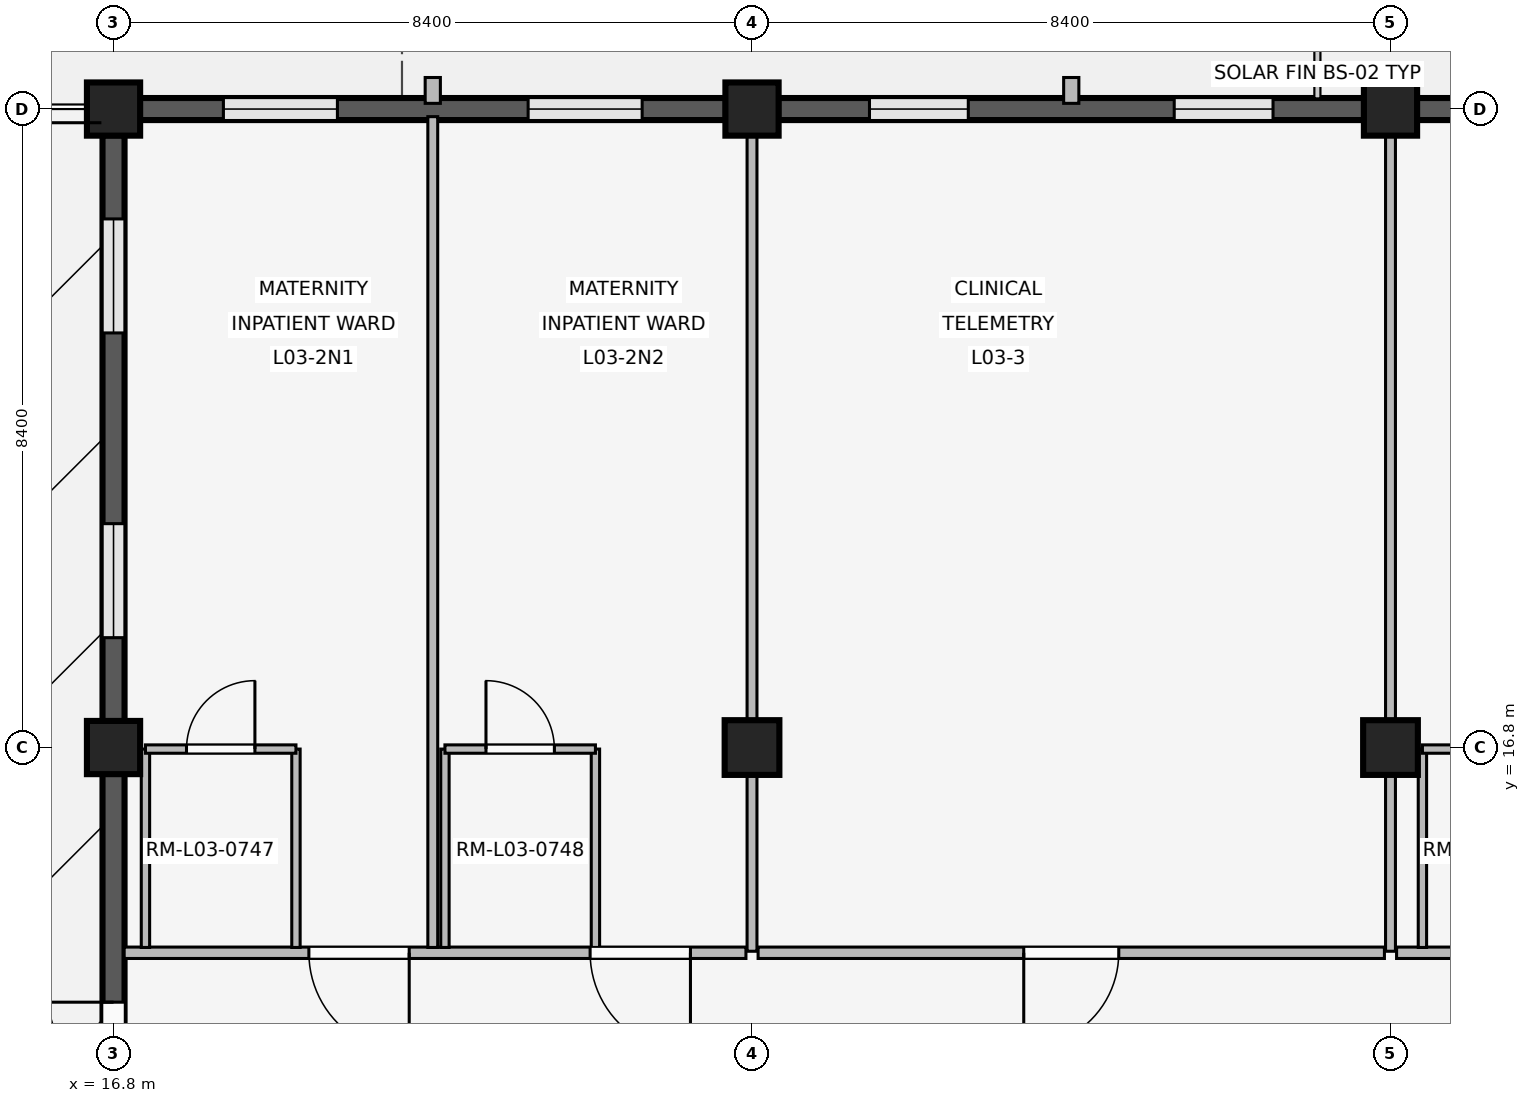
"""IFC4 building model, lengths in metres.
Left out: names, types, materials, properties, quantities, classifications, styles, units other than length and angle.
Written with IfcOpenShell. Run it as: python <this file> out.ifc"""

import sys

from ifc_helpers import new_model, si_unit, direction, frame, frame_2d, origin, origin_2d, place, context, subcontext, project, spatial, rectangle, extrude, element, fill, save


model = new_model("IFC4")
c1 = context("Model", 3, precision=1e-05, world=origin(), true_north=direction((0.0, 1.0)))
c2 = subcontext(c1, "Body", "Model", "MODEL_VIEW")
j1 = project(units=[si_unit("LENGTHUNIT", "METRE"), si_unit("PLANEANGLEUNIT", "RADIAN")], contexts=[c1])
p1 = place(None, origin())
s1 = spatial("IfcSite", under=j1, at=p1, CompositionType="ELEMENT")
p2 = place(p1, origin())
s2 = spatial("IfcBuilding", under=s1, at=p2, CompositionType="ELEMENT")
p3 = place(p2, frame((0.0, 0.0, 12.9)))
s3 = spatial("IfcBuildingStorey", under=s2, at=p3, CompositionType="ELEMENT", Elevation=12.9)
for number, where, z_axis, x_axis in (
    (1, (16.8, 16.8, 0.0), (0.0, 0.0, 1.0), (1.0, 0.0, 0.0)),
    (2, (16.8, 25.2, 0.0), (0.0, 0.0, 1.0), (1.0, 0.0, 0.0)),
):
    element("IfcColumn", number, at=place(p3, frame(where, z_axis=z_axis, x_axis=x_axis)), inside=s3, PredefinedType="COLUMN", context=c2, shape_type="SweptSolid", body=[
        extrude(rectangle(XDim=0.7, YDim=0.7, at=origin_2d()), origin(), (0.0, 0.0, 1.0), 3.3),
    ])
p4 = place(p3, frame((25.2, 16.8, 0.0), z_axis=(0.0, 0.0, 1.0), x_axis=(1.0, 0.0, 0.0)))
e3 = element("IfcColumn", 3, at=p4, inside=s3, PredefinedType="COLUMN", context=c2, shape_type="SweptSolid", body=[
    extrude(rectangle(XDim=0.72, YDim=0.72, at=origin_2d()), origin(), (0.0, 0.0, 1.0), 3.3),
])
p5 = place(p3, frame((25.2, 25.2, 0.0), z_axis=(0.0, 0.0, 1.0), x_axis=(1.0, 0.0, 0.0)))
e4 = element("IfcColumn", 4, at=p5, inside=s3, PredefinedType="COLUMN", context=c2, shape_type="SweptSolid", body=[
    extrude(rectangle(XDim=0.7, YDim=0.7, at=origin_2d()), origin(), (0.0, 0.0, 1.0), 3.3),
])
p6 = place(p3, frame((33.6, 16.8, 0.0), z_axis=(0.0, 0.0, 1.0), x_axis=(1.0, 0.0, 0.0)))
e5 = element("IfcColumn", 5, at=p6, inside=s3, PredefinedType="COLUMN", context=c2, shape_type="SweptSolid", body=[
    extrude(rectangle(XDim=0.72, YDim=0.72, at=origin_2d()), origin(), (0.0, 0.0, 1.0), 3.3),
])
p7 = place(p3, frame((33.6, 25.2, 0.0), z_axis=(0.0, 0.0, 1.0), x_axis=(1.0, 0.0, 0.0)))
e6 = element("IfcColumn", 6, at=p7, inside=s3, PredefinedType="COLUMN", context=c2, shape_type="SweptSolid", body=[
    extrude(rectangle(XDim=0.7, YDim=0.7, at=origin_2d()), origin(), (0.0, 0.0, 1.0), 3.3),
])
p8 = place(p3, frame((16.8, 8.745, 0.0), z_axis=(0.0, 0.0, 1.0), x_axis=(0.0, 1.0, 0.0)))
e7 = element("IfcWall", 7, at=p8, inside=s3, PredefinedType="SOLIDWALL", context=c2, shape_type="SweptSolid", body=[
    extrude(rectangle(XDim=7.71, YDim=0.29, at=frame_2d((3.855, 0.0))), origin(), (0.0, 0.0, 1.0), 2.44),
])
p9 = place(p8, frame((3.005, 0.0, 0.0)))
e8 = element("IfcOpeningElement", 8, at=p9, cuts=e7, PredefinedType="OPENING", context=c2, shape_type="SweptSolid", body=[
    extrude(rectangle(XDim=1.7, YDim=2.3, at=frame_2d((0.85, 1.15))), frame((0.0, 0.155, 0.0), z_axis=(0.0, -1.0, 0.0), x_axis=(1.0, 0.0, 0.0)), (0.0, 0.0, 1.0), 0.31),
])
p10 = place(p3, frame((17.145, 25.2, 0.0), z_axis=(0.0, 0.0, 1.0), x_axis=(1.0, 0.0, 0.0)))
e9 = element("IfcWall", 9, at=p10, inside=s3, PredefinedType="SOLIDWALL", context=c2, shape_type="SweptSolid", body=[
    extrude(rectangle(XDim=7.71, YDim=0.29, at=frame_2d((3.855, 0.0))), origin(), (0.0, 0.0, 1.0), 2.44),
])
p11 = place(p10, frame((1.1, 0.0, 1.05)))
e10 = element("IfcOpeningElement", 10, at=p11, cuts=e9, PredefinedType="OPENING", context=c2, shape_type="SweptSolid", body=[
    extrude(rectangle(XDim=1.5, YDim=0.75, at=frame_2d((0.75, 0.375))), frame((0.0, 0.155, 0.0), z_axis=(0.0, -1.0, 0.0), x_axis=(1.0, 0.0, 0.0)), (0.0, 0.0, 1.0), 0.31),
])
p12 = place(p10, frame((5.11, 0.0, 1.05)))
e11 = element("IfcOpeningElement", 11, at=p12, cuts=e9, PredefinedType="OPENING", context=c2, shape_type="SweptSolid", body=[
    extrude(rectangle(XDim=1.5, YDim=0.75, at=frame_2d((0.75, 0.375))), frame((0.0, 0.155, 0.0), z_axis=(0.0, -1.0, 0.0), x_axis=(1.0, 0.0, 0.0)), (0.0, 0.0, 1.0), 0.31),
])
p13 = place(p3, frame((21.0, 25.275, 0.0), z_axis=(0.0, 0.0, 1.0), x_axis=(0.0, 1.0, 0.0)))
e12 = element("IfcWall", 12, at=p13, inside=s3, PredefinedType="ELEMENTEDWALL", context=c2, shape_type="SweptSolid", body=[
    extrude(rectangle(XDim=0.34, YDim=0.2, at=frame_2d((0.17, 0.0))), origin(), (0.0, 0.0, 1.0), 2.42),
])
p14 = place(p3, frame((16.8, 17.145, 0.0), z_axis=(0.0, 0.0, 1.0), x_axis=(0.0, 1.0, 0.0)))
e13 = element("IfcWall", 13, at=p14, inside=s3, PredefinedType="SOLIDWALL", context=c2, shape_type="SweptSolid", body=[
    extrude(rectangle(XDim=7.71, YDim=0.29, at=frame_2d((3.855, 0.0))), origin(), (0.0, 0.0, 1.0), 2.44),
])
p15 = place(p14, frame((1.1, 0.0, 1.05)))
e14 = element("IfcOpeningElement", 14, at=p15, cuts=e13, PredefinedType="OPENING", context=c2, shape_type="SweptSolid", body=[
    extrude(rectangle(XDim=1.5, YDim=0.75, at=frame_2d((0.75, 0.375))), frame((0.0, 0.155, 0.0), z_axis=(0.0, -1.0, 0.0), x_axis=(1.0, 0.0, 0.0)), (0.0, 0.0, 1.0), 0.31),
])
p16 = place(p14, frame((5.11, 0.0, 1.05)))
e15 = element("IfcOpeningElement", 15, at=p16, cuts=e13, PredefinedType="OPENING", context=c2, shape_type="SweptSolid", body=[
    extrude(rectangle(XDim=1.5, YDim=0.75, at=frame_2d((0.75, 0.375))), frame((0.0, 0.155, 0.0), z_axis=(0.0, -1.0, 0.0), x_axis=(1.0, 0.0, 0.0)), (0.0, 0.0, 1.0), 0.31),
])
p17 = place(p3, frame((25.545, 25.2, 0.0), z_axis=(0.0, 0.0, 1.0), x_axis=(1.0, 0.0, 0.0)))
e16 = element("IfcWall", 16, at=p17, inside=s3, PredefinedType="SOLIDWALL", context=c2, shape_type="SweptSolid", body=[
    extrude(rectangle(XDim=7.71, YDim=0.29, at=frame_2d((3.855, 0.0))), origin(), (0.0, 0.0, 1.0), 2.44),
])
p18 = place(p17, frame((1.2, 0.0, 1.05)))
e17 = element("IfcOpeningElement", 17, at=p18, cuts=e16, PredefinedType="OPENING", context=c2, shape_type="SweptSolid", body=[
    extrude(rectangle(XDim=1.3, YDim=0.75, at=frame_2d((0.65, 0.375))), frame((0.0, 0.155, 0.0), z_axis=(0.0, -1.0, 0.0), x_axis=(1.0, 0.0, 0.0)), (0.0, 0.0, 1.0), 0.31),
])
p19 = place(p17, frame((5.21, 0.0, 1.05)))
e18 = element("IfcOpeningElement", 18, at=p19, cuts=e16, PredefinedType="OPENING", context=c2, shape_type="SweptSolid", body=[
    extrude(rectangle(XDim=1.3, YDim=0.75, at=frame_2d((0.65, 0.375))), frame((0.0, 0.155, 0.0), z_axis=(0.0, -1.0, 0.0), x_axis=(1.0, 0.0, 0.0)), (0.0, 0.0, 1.0), 0.31),
])
p20 = place(p3, frame((29.4, 25.275, 0.0), z_axis=(0.0, 0.0, 1.0), x_axis=(0.0, 1.0, 0.0)))
e19 = element("IfcWall", 19, at=p20, inside=s3, PredefinedType="ELEMENTEDWALL", context=c2, shape_type="SweptSolid", body=[
    extrude(rectangle(XDim=0.34, YDim=0.2, at=frame_2d((0.17, 0.0))), origin(), (0.0, 0.0, 1.0), 2.42),
])
p21 = place(p3, frame((33.945, 25.2, 0.0), z_axis=(0.0, 0.0, 1.0), x_axis=(1.0, 0.0, 0.0)))
e20 = element("IfcWall", 20, at=p21, inside=s3, PredefinedType="SOLIDWALL", context=c2, shape_type="SweptSolid", body=[
    extrude(rectangle(XDim=7.71, YDim=0.29, at=frame_2d((3.855, 0.0))), origin(), (0.0, 0.0, 1.0), 2.44),
])
p22 = place(p21, frame((0.963, 0.0, 0.85)))
e21 = element("IfcOpeningElement", 21, at=p22, cuts=e20, PredefinedType="OPENING", context=c2, shape_type="SweptSolid", body=[
    extrude(rectangle(XDim=1.62, YDim=0.95, at=frame_2d((0.81, 0.475))), frame((0.0, 0.155, 0.0), z_axis=(0.0, -1.0, 0.0), x_axis=(1.0, 0.0, 0.0)), (0.0, 0.0, 1.0), 0.31),
])
p23 = place(p21, frame((5.127, 0.0, 0.85)))
e22 = element("IfcOpeningElement", 22, at=p23, cuts=e20, PredefinedType="OPENING", context=c2, shape_type="SweptSolid", body=[
    extrude(rectangle(XDim=1.62, YDim=0.95, at=frame_2d((0.81, 0.475))), frame((0.0, 0.155, 0.0), z_axis=(0.0, -1.0, 0.0), x_axis=(1.0, 0.0, 0.0)), (0.0, 0.0, 1.0), 0.31),
])
p24 = place(p3, frame((25.12, 14.1, 0.0), z_axis=(0.0, 0.0, 1.0), x_axis=(-1.0, 0.0, 0.0)))
e23 = element("IfcWall", 23, at=p24, inside=s3, PredefinedType="PARTITIONING", context=c2, shape_type="SweptSolid", body=[
    extrude(rectangle(XDim=8.18, YDim=0.15, at=frame_2d((4.09, 0.0))), origin(), (0.0, 0.0, 1.0), 2.42),
])
p25 = place(p24, frame((0.73, 0.0, 0.0)))
e24 = element("IfcOpeningElement", 24, at=p25, cuts=e23, PredefinedType="OPENING", context=c2, shape_type="SweptSolid", body=[
    extrude(rectangle(XDim=1.32, YDim=2.25, at=frame_2d((0.66, 1.125))), frame((0.0, 0.085, 0.0), z_axis=(0.0, -1.0, 0.0), x_axis=(1.0, 0.0, 0.0)), (0.0, 0.0, 1.0), 0.17),
])
p26 = place(p24, frame((4.43, 0.0, 0.0)))
e25 = element("IfcOpeningElement", 25, at=p26, cuts=e23, PredefinedType="OPENING", context=c2, shape_type="SweptSolid", body=[
    extrude(rectangle(XDim=1.32, YDim=2.25, at=frame_2d((0.66, 1.125))), frame((0.0, 0.085, 0.0), z_axis=(0.0, -1.0, 0.0), x_axis=(1.0, 0.0, 0.0)), (0.0, 0.0, 1.0), 0.17),
])
p27 = place(p3, frame((21.0, 14.17, 0.0), z_axis=(0.0, 0.0, 1.0), x_axis=(0.0, 1.0, 0.0)))
e26 = element("IfcWall", 26, at=p27, inside=s3, PredefinedType="PARTITIONING", context=c2, shape_type="SweptSolid", body=[
    extrude(rectangle(XDim=10.93, YDim=0.13, at=frame_2d((5.465, 0.0))), origin(), (0.0, 0.0, 1.0), 2.42),
])
for number, where, z_axis, x_axis in (
    (27, (17.22, 14.17, 0.0), (0.0, 0.0, 1.0), (0.0, 1.0, 0.0)),
    (28, (19.2, 14.17, 0.0), (0.0, 0.0, 1.0), (0.0, 1.0, 0.0)),
):
    element("IfcWall", number, at=place(p3, frame(where, z_axis=z_axis, x_axis=x_axis)), inside=s3, PredefinedType="PARTITIONING", context=c2, shape_type="SweptSolid", body=[
        extrude(rectangle(XDim=2.61, YDim=0.11, at=frame_2d((1.305, 0.0))), origin(), (0.0, 0.0, 1.0), 2.42),
    ])
p28 = place(p3, frame((17.22, 16.78, 0.0), z_axis=(0.0, 0.0, 1.0), x_axis=(1.0, 0.0, 0.0)))
e29 = element("IfcWall", 29, at=p28, inside=s3, PredefinedType="PARTITIONING", context=c2, shape_type="SweptSolid", body=[
    extrude(rectangle(XDim=1.98, YDim=0.11, at=frame_2d((0.99, 0.0))), origin(), (0.0, 0.0, 1.0), 2.42),
])
p29 = place(p28, frame((0.54, 0.0, 0.0)))
e30 = element("IfcOpeningElement", 30, at=p29, cuts=e29, PredefinedType="OPENING", context=c2, shape_type="SweptSolid", body=[
    extrude(rectangle(XDim=0.9, YDim=2.1, at=frame_2d((0.45, 1.05))), frame((0.0, 0.065, 0.0), z_axis=(0.0, -1.0, 0.0), x_axis=(1.0, 0.0, 0.0)), (0.0, 0.0, 1.0), 0.13),
])
for number, where, z_axis, x_axis in (
    (31, (21.16, 14.17, 0.0), (0.0, 0.0, 1.0), (0.0, 1.0, 0.0)),
    (32, (23.14, 14.17, 0.0), (0.0, 0.0, 1.0), (0.0, 1.0, 0.0)),
):
    element("IfcWall", number, at=place(p3, frame(where, z_axis=z_axis, x_axis=x_axis)), inside=s3, PredefinedType="PARTITIONING", context=c2, shape_type="SweptSolid", body=[
        extrude(rectangle(XDim=2.61, YDim=0.11, at=frame_2d((1.305, 0.0))), origin(), (0.0, 0.0, 1.0), 2.42),
    ])
p30 = place(p3, frame((21.16, 16.78, 0.0), z_axis=(0.0, 0.0, 1.0), x_axis=(1.0, 0.0, 0.0)))
e33 = element("IfcWall", 33, at=p30, inside=s3, PredefinedType="PARTITIONING", context=c2, shape_type="SweptSolid", body=[
    extrude(rectangle(XDim=1.98, YDim=0.11, at=frame_2d((0.99, 0.0))), origin(), (0.0, 0.0, 1.0), 2.42),
])
p31 = place(p30, frame((0.54, 0.0, 0.0)))
e34 = element("IfcOpeningElement", 34, at=p31, cuts=e33, PredefinedType="OPENING", context=c2, shape_type="SweptSolid", body=[
    extrude(rectangle(XDim=0.9, YDim=2.1, at=frame_2d((0.45, 1.05))), frame((0.0, 0.065, 0.0), z_axis=(0.0, -1.0, 0.0), x_axis=(1.0, 0.0, 0.0)), (0.0, 0.0, 1.0), 0.13),
])
p32 = place(p3, frame((25.2, 14.12, 0.0), z_axis=(0.0, 0.0, 1.0), x_axis=(0.0, 1.0, 0.0)))
e35 = element("IfcWall", 35, at=p32, inside=s3, PredefinedType="PARTITIONING", context=c2, shape_type="SweptSolid", body=[
    extrude(rectangle(XDim=10.94, YDim=0.13, at=frame_2d((5.47, 0.0))), origin(), (0.0, 0.0, 1.0), 2.42),
])
p33 = place(p3, frame((33.52, 14.1, 0.0), z_axis=(0.0, 0.0, 1.0), x_axis=(-1.0, 0.0, 0.0)))
e36 = element("IfcWall", 36, at=p33, inside=s3, PredefinedType="PARTITIONING", context=c2, shape_type="SweptSolid", body=[
    extrude(rectangle(XDim=8.24, YDim=0.15, at=frame_2d((4.12, 0.0))), origin(), (0.0, 0.0, 1.0), 2.42),
])
p34 = place(p33, frame((3.495, 0.0, 0.0)))
e37 = element("IfcOpeningElement", 37, at=p34, cuts=e36, PredefinedType="OPENING", context=c2, shape_type="SweptSolid", body=[
    extrude(rectangle(XDim=1.25, YDim=2.2, at=frame_2d((0.625, 1.1))), frame((0.0, 0.085, 0.0), z_axis=(0.0, -1.0, 0.0), x_axis=(1.0, 0.0, 0.0)), (0.0, 0.0, 1.0), 0.17),
])
p35 = place(p3, frame((33.6, 14.12, 0.0), z_axis=(0.0, 0.0, 1.0), x_axis=(0.0, 1.0, 0.0)))
e38 = element("IfcWall", 38, at=p35, inside=s3, PredefinedType="PARTITIONING", context=c2, shape_type="SweptSolid", body=[
    extrude(rectangle(XDim=10.94, YDim=0.13, at=frame_2d((5.47, 0.0))), origin(), (0.0, 0.0, 1.0), 2.42),
])
p36 = place(p3, frame((41.64, 14.1, 0.0), z_axis=(0.0, 0.0, 1.0), x_axis=(-1.0, 0.0, 0.0)))
e39 = element("IfcWall", 39, at=p36, inside=s3, PredefinedType="PARTITIONING", context=c2, shape_type="SweptSolid", body=[
    extrude(rectangle(XDim=7.96, YDim=0.15, at=frame_2d((3.98, 0.0))), origin(), (0.0, 0.0, 1.0), 2.42),
])
p37 = place(p36, frame((0.45, 0.0, 0.0)))
e40 = element("IfcOpeningElement", 40, at=p37, cuts=e39, PredefinedType="OPENING", context=c2, shape_type="SweptSolid", body=[
    extrude(rectangle(XDim=1.32, YDim=2.25, at=frame_2d((0.66, 1.125))), frame((0.0, 0.085, 0.0), z_axis=(0.0, -1.0, 0.0), x_axis=(1.0, 0.0, 0.0)), (0.0, 0.0, 1.0), 0.17),
])
p38 = place(p36, frame((4.15, 0.0, 0.0)))
e41 = element("IfcOpeningElement", 41, at=p38, cuts=e39, PredefinedType="OPENING", context=c2, shape_type="SweptSolid", body=[
    extrude(rectangle(XDim=1.32, YDim=2.25, at=frame_2d((0.66, 1.125))), frame((0.0, 0.085, 0.0), z_axis=(0.0, -1.0, 0.0), x_axis=(1.0, 0.0, 0.0)), (0.0, 0.0, 1.0), 0.17),
])
p39 = place(p3, frame((34.02, 14.17, 0.0), z_axis=(0.0, 0.0, 1.0), x_axis=(0.0, 1.0, 0.0)))
e42 = element("IfcWall", 42, at=p39, inside=s3, PredefinedType="PARTITIONING", context=c2, shape_type="SweptSolid", body=[
    extrude(rectangle(XDim=2.61, YDim=0.11, at=frame_2d((1.305, 0.0))), origin(), (0.0, 0.0, 1.0), 2.42),
])
p40 = place(p3, frame((34.02, 16.78, 0.0), z_axis=(0.0, 0.0, 1.0), x_axis=(1.0, 0.0, 0.0)))
e43 = element("IfcWall", 43, at=p40, inside=s3, PredefinedType="PARTITIONING", context=c2, shape_type="SweptSolid", body=[
    extrude(rectangle(XDim=1.98, YDim=0.11, at=frame_2d((0.99, 0.0))), origin(), (0.0, 0.0, 1.0), 2.42),
])
p41 = place(p40, frame((0.54, 0.0, 0.0)))
e44 = element("IfcOpeningElement", 44, at=p41, cuts=e43, PredefinedType="OPENING", context=c2, shape_type="SweptSolid", body=[
    extrude(rectangle(XDim=0.9, YDim=2.1, at=frame_2d((0.45, 1.05))), frame((0.0, 0.065, 0.0), z_axis=(0.0, -1.0, 0.0), x_axis=(1.0, 0.0, 0.0)), (0.0, 0.0, 1.0), 0.13),
])
p42 = place(p9, origin())
e45 = element("IfcDoor", 45, at=p42, inside=s3, OperationType="DOUBLE_SWING_LEFT", PredefinedType="DOOR", context=c2, shape_type="SweptSolid", body=[
    extrude(rectangle(XDim=1.7, YDim=2.3, at=frame_2d((0.85, 1.15))), frame((0.0, 0.025, 0.0), z_axis=(0.0, -1.0, 0.0), x_axis=(1.0, 0.0, 0.0)), (0.0, 0.0, 1.0), 0.05),
])
fill(e8, e45)
p43 = place(p11, origin())
e46 = element("IfcWindow", 46, at=p43, inside=s3, PartitioningType="SINGLE_PANEL", PredefinedType="WINDOW", context=c2, shape_type="SweptSolid", body=[
    extrude(rectangle(XDim=1.5, YDim=0.75, at=frame_2d((0.75, 0.375))), frame((0.0, 0.03, 0.0), z_axis=(0.0, -1.0, 0.0), x_axis=(1.0, 0.0, 0.0)), (0.0, 0.0, 1.0), 0.06),
])
fill(e10, e46)
p44 = place(p12, origin())
e47 = element("IfcWindow", 47, at=p44, inside=s3, PartitioningType="SINGLE_PANEL", PredefinedType="WINDOW", context=c2, shape_type="SweptSolid", body=[
    extrude(rectangle(XDim=1.5, YDim=0.75, at=frame_2d((0.75, 0.375))), frame((0.0, 0.03, 0.0), z_axis=(0.0, -1.0, 0.0), x_axis=(1.0, 0.0, 0.0)), (0.0, 0.0, 1.0), 0.06),
])
fill(e11, e47)
p45 = place(p15, origin())
e48 = element("IfcWindow", 48, at=p45, inside=s3, PartitioningType="SINGLE_PANEL", PredefinedType="WINDOW", context=c2, shape_type="SweptSolid", body=[
    extrude(rectangle(XDim=1.5, YDim=0.75, at=frame_2d((0.75, 0.375))), frame((0.0, 0.03, 0.0), z_axis=(0.0, -1.0, 0.0), x_axis=(1.0, 0.0, 0.0)), (0.0, 0.0, 1.0), 0.06),
])
fill(e14, e48)
p46 = place(p16, origin())
e49 = element("IfcWindow", 49, at=p46, inside=s3, PartitioningType="SINGLE_PANEL", PredefinedType="WINDOW", context=c2, shape_type="SweptSolid", body=[
    extrude(rectangle(XDim=1.5, YDim=0.75, at=frame_2d((0.75, 0.375))), frame((0.0, 0.03, 0.0), z_axis=(0.0, -1.0, 0.0), x_axis=(1.0, 0.0, 0.0)), (0.0, 0.0, 1.0), 0.06),
])
fill(e15, e49)
p47 = place(p18, origin())
e50 = element("IfcWindow", 50, at=p47, inside=s3, PartitioningType="SINGLE_PANEL", PredefinedType="WINDOW", context=c2, shape_type="SweptSolid", body=[
    extrude(rectangle(XDim=1.3, YDim=0.75, at=frame_2d((0.65, 0.375))), frame((0.0, 0.03, 0.0), z_axis=(0.0, -1.0, 0.0), x_axis=(1.0, 0.0, 0.0)), (0.0, 0.0, 1.0), 0.06),
])
fill(e17, e50)
p48 = place(p19, origin())
e51 = element("IfcWindow", 51, at=p48, inside=s3, PartitioningType="SINGLE_PANEL", PredefinedType="WINDOW", context=c2, shape_type="SweptSolid", body=[
    extrude(rectangle(XDim=1.3, YDim=0.75, at=frame_2d((0.65, 0.375))), frame((0.0, 0.03, 0.0), z_axis=(0.0, -1.0, 0.0), x_axis=(1.0, 0.0, 0.0)), (0.0, 0.0, 1.0), 0.06),
])
fill(e18, e51)
p49 = place(p25, origin())
e52 = element("IfcDoor", 52, at=p49, inside=s3, OperationType="SINGLE_SWING_LEFT", PredefinedType="DOOR", context=c2, shape_type="SweptSolid", body=[
    extrude(rectangle(XDim=1.32, YDim=2.25, at=frame_2d((0.66, 1.125))), frame((0.0, 0.025, 0.0), z_axis=(0.0, -1.0, 0.0), x_axis=(1.0, 0.0, 0.0)), (0.0, 0.0, 1.0), 0.05),
])
fill(e24, e52)
p50 = place(p26, origin())
e53 = element("IfcDoor", 53, at=p50, inside=s3, OperationType="SINGLE_SWING_LEFT", PredefinedType="DOOR", context=c2, shape_type="SweptSolid", body=[
    extrude(rectangle(XDim=1.32, YDim=2.25, at=frame_2d((0.66, 1.125))), frame((0.0, 0.025, 0.0), z_axis=(0.0, -1.0, 0.0), x_axis=(1.0, 0.0, 0.0)), (0.0, 0.0, 1.0), 0.05),
])
fill(e25, e53)
p51 = place(p29, origin())
e54 = element("IfcDoor", 54, at=p51, inside=s3, OperationType="SINGLE_SWING_RIGHT", PredefinedType="DOOR", context=c2, shape_type="SweptSolid", body=[
    extrude(rectangle(XDim=0.9, YDim=2.1, at=frame_2d((0.45, 1.05))), frame((0.0, 0.025, 0.0), z_axis=(0.0, -1.0, 0.0), x_axis=(1.0, 0.0, 0.0)), (0.0, 0.0, 1.0), 0.05),
])
fill(e30, e54)
p52 = place(p31, origin())
e55 = element("IfcDoor", 55, at=p52, inside=s3, OperationType="SINGLE_SWING_LEFT", PredefinedType="DOOR", context=c2, shape_type="SweptSolid", body=[
    extrude(rectangle(XDim=0.9, YDim=2.1, at=frame_2d((0.45, 1.05))), frame((0.0, 0.025, 0.0), z_axis=(0.0, -1.0, 0.0), x_axis=(1.0, 0.0, 0.0)), (0.0, 0.0, 1.0), 0.05),
])
fill(e34, e55)
p53 = place(p34, origin())
e56 = element("IfcDoor", 56, at=p53, inside=s3, OperationType="SINGLE_SWING_RIGHT", PredefinedType="DOOR", context=c2, shape_type="SweptSolid", body=[
    extrude(rectangle(XDim=1.25, YDim=2.2, at=frame_2d((0.625, 1.1))), frame((0.0, 0.025, 0.0), z_axis=(0.0, -1.0, 0.0), x_axis=(1.0, 0.0, 0.0)), (0.0, 0.0, 1.0), 0.05),
])
fill(e37, e56)
save(model, sys.argv[1])
